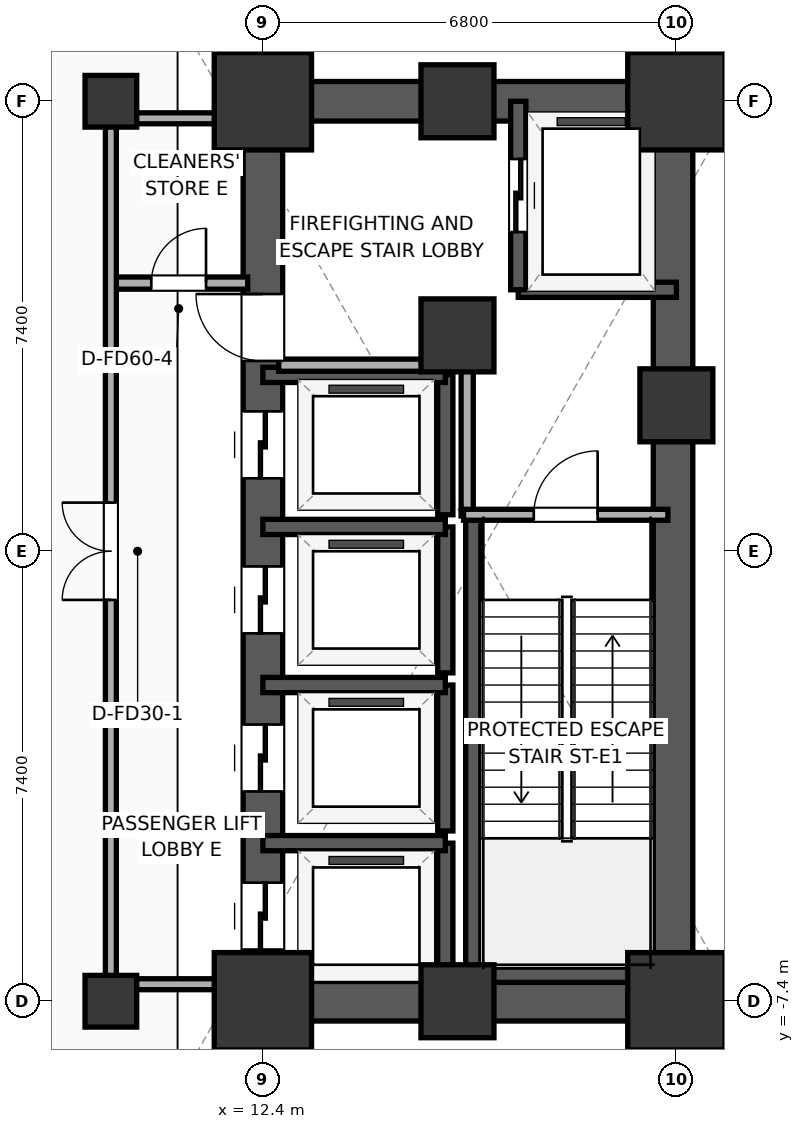
"""IFC4 building model, lengths in metres.
Left out: names, types, materials, properties, quantities, classifications, styles, units other than length and angle.
Written with IfcOpenShell. Run it as: python <this file> out.ifc"""

import sys

from ifc_helpers import new_model, si_unit, direction, frame, frame_2d, origin, origin_2d, place, context, subcontext, project, spatial, rectangle, extrude, element, fill, save


model = new_model("IFC4")
c1 = context("Model", 3, precision=1e-05, world=origin(), true_north=direction((0.0, 1.0)))
c2 = subcontext(c1, "Body", "Model", "MODEL_VIEW")
j1 = project(units=[si_unit("LENGTHUNIT", "METRE"), si_unit("PLANEANGLEUNIT", "RADIAN")], contexts=[c1])
p1 = place(None, origin())
s1 = spatial("IfcSite", under=j1, at=p1, CompositionType="ELEMENT")
p2 = place(p1, origin())
s2 = spatial("IfcBuilding", under=s1, at=p2, CompositionType="ELEMENT")
p3 = place(p2, frame((0.0, 0.0, -10.4)))
s3 = spatial("IfcBuildingStorey", under=s2, at=p3, CompositionType="ELEMENT", Elevation=-10.4)
p4 = place(p3, frame((12.4, -7.4, 0.0), z_axis=(0.0, 0.0, 1.0), x_axis=(1.0, 0.0, 0.0)))
e1 = element("IfcColumn", 1, at=p4, inside=s3, PredefinedType="COLUMN", context=c2, shape_type="SweptSolid", body=[
    extrude(rectangle(XDim=1.6, YDim=1.6, at=origin_2d()), origin(), (0.0, 0.0, 1.0), 5.2),
])
p5 = place(p3, frame((15.6, 3.55, 0.0), z_axis=(0.0, 0.0, 1.0), x_axis=(1.0, 0.0, 0.0)))
e2 = element("IfcColumn", 2, at=p5, inside=s3, PredefinedType="COLUMN", context=c2, shape_type="SweptSolid", body=[
    extrude(rectangle(XDim=1.2, YDim=1.2, at=origin_2d()), origin(), (0.0, 0.0, 1.0), 5.2),
])
p6 = place(p3, frame((12.4, 7.4, 0.0), z_axis=(0.0, 0.0, 1.0), x_axis=(1.0, 0.0, 0.0)))
e3 = element("IfcColumn", 3, at=p6, inside=s3, PredefinedType="COLUMN", context=c2, shape_type="SweptSolid", body=[
    extrude(rectangle(XDim=1.6, YDim=1.6, at=origin_2d()), origin(), (0.0, 0.0, 1.0), 5.2),
])
for number, where, z_axis, x_axis in (
    (4, (15.6, -7.4, 0.0), (0.0, 0.0, 1.0), (1.0, 0.0, 0.0)),
    (5, (15.6, 7.4, 0.0), (0.0, 0.0, 1.0), (1.0, 0.0, 0.0)),
):
    element("IfcColumn", number, at=place(p3, frame(where, z_axis=z_axis, x_axis=x_axis)), inside=s3, PredefinedType="COLUMN", context=c2, shape_type="SweptSolid", body=[
        extrude(rectangle(XDim=1.2, YDim=1.2, at=origin_2d()), origin(), (0.0, 0.0, 1.0), 5.2),
    ])
p7 = place(p3, frame((19.2, -7.4, 0.0), z_axis=(0.0, 0.0, 1.0), x_axis=(1.0, 0.0, 0.0)))
e6 = element("IfcColumn", 6, at=p7, inside=s3, PredefinedType="COLUMN", context=c2, shape_type="SweptSolid", body=[
    extrude(rectangle(XDim=1.6, YDim=1.6, at=origin_2d()), origin(), (0.0, 0.0, 1.0), 5.2),
])
p8 = place(p3, frame((19.2, 2.4, 0.0), z_axis=(0.0, 0.0, 1.0), x_axis=(1.0, 0.0, 0.0)))
e7 = element("IfcColumn", 7, at=p8, inside=s3, PredefinedType="COLUMN", context=c2, shape_type="SweptSolid", body=[
    extrude(rectangle(XDim=1.2, YDim=1.2, at=origin_2d()), origin(), (0.0, 0.0, 1.0), 5.2),
])
p9 = place(p3, frame((19.2, 7.4, 0.0), z_axis=(0.0, 0.0, 1.0), x_axis=(1.0, 0.0, 0.0)))
e8 = element("IfcColumn", 8, at=p9, inside=s3, PredefinedType="COLUMN", context=c2, shape_type="SweptSolid", body=[
    extrude(rectangle(XDim=1.6, YDim=1.6, at=origin_2d()), origin(), (0.0, 0.0, 1.0), 5.2),
])
for number, where, z_axis, x_axis in (
    (9, (12.075, -7.4, 0.0), (0.0, 0.0, 1.0), (1.0, 0.0, 0.0)),
    (10, (12.075, 7.4, 0.0), (0.0, 0.0, 1.0), (1.0, 0.0, 0.0)),
):
    element("IfcWall", number, at=place(p3, frame(where, z_axis=z_axis, x_axis=x_axis)), inside=s3, PredefinedType="SHEAR", context=c2, shape_type="SweptSolid", body=[
        extrude(rectangle(XDim=7.45, YDim=0.65, at=frame_2d((3.725, 0.0))), origin(), (0.0, 0.0, 1.0), 4.88),
    ])
p10 = place(p3, frame((12.4, -7.4, 0.0), z_axis=(0.0, 0.0, 1.0), x_axis=(0.0, 1.0, 0.0)))
e11 = element("IfcWall", 11, at=p10, inside=s3, PredefinedType="SHEAR", context=c2, shape_type="SweptSolid", body=[
    extrude(rectangle(XDim=14.8, YDim=0.65, at=frame_2d((7.4, 0.0))), origin(), (0.0, 0.0, 1.0), 4.88),
])
p11 = place(p10, frame((0.85, 0.0, 0.0)))
e12 = element("IfcOpeningElement", 12, at=p11, cuts=e11, PredefinedType="OPENING", context=c2, shape_type="SweptSolid", body=[
    extrude(rectangle(XDim=1.1, YDim=2.05, at=frame_2d((0.55, 1.025))), frame((0.0, 0.335, 0.0), z_axis=(0.0, -1.0, 0.0), x_axis=(1.0, 0.0, 0.0)), (0.0, 0.0, 1.0), 0.67),
])
p12 = place(p10, frame((3.45, 0.0, 0.0)))
e13 = element("IfcOpeningElement", 13, at=p12, cuts=e11, PredefinedType="OPENING", context=c2, shape_type="SweptSolid", body=[
    extrude(rectangle(XDim=1.1, YDim=2.05, at=frame_2d((0.55, 1.025))), frame((0.0, 0.335, 0.0), z_axis=(0.0, -1.0, 0.0), x_axis=(1.0, 0.0, 0.0)), (0.0, 0.0, 1.0), 0.67),
])
p13 = place(p10, frame((6.05, 0.0, 0.0)))
e14 = element("IfcOpeningElement", 14, at=p13, cuts=e11, PredefinedType="OPENING", context=c2, shape_type="SweptSolid", body=[
    extrude(rectangle(XDim=1.1, YDim=2.05, at=frame_2d((0.55, 1.025))), frame((0.0, 0.335, 0.0), z_axis=(0.0, -1.0, 0.0), x_axis=(1.0, 0.0, 0.0)), (0.0, 0.0, 1.0), 0.67),
])
p14 = place(p10, frame((8.6, 0.0, 0.0)))
e15 = element("IfcOpeningElement", 15, at=p14, cuts=e11, PredefinedType="OPENING", context=c2, shape_type="SweptSolid", body=[
    extrude(rectangle(XDim=1.1, YDim=2.05, at=frame_2d((0.55, 1.025))), frame((0.0, 0.335, 0.0), z_axis=(0.0, -1.0, 0.0), x_axis=(1.0, 0.0, 0.0)), (0.0, 0.0, 1.0), 0.67),
])
p15 = place(p10, frame((10.53, 0.0, 0.0)))
e16 = element("IfcOpeningElement", 16, at=p15, cuts=e11, PredefinedType="OPENING", context=c2, shape_type="SweptSolid", body=[
    extrude(rectangle(XDim=1.1, YDim=2.05, at=frame_2d((0.55, 1.025))), frame((0.0, 0.335, 0.0), z_axis=(0.0, -1.0, 0.0), x_axis=(1.0, 0.0, 0.0)), (0.0, 0.0, 1.0), 0.67),
])
p16 = place(p3, frame((19.145, -7.4, 0.0), z_axis=(0.0, 0.0, 1.0), x_axis=(0.0, 1.0, 0.0)))
e17 = element("IfcWall", 17, at=p16, inside=s3, PredefinedType="SHEAR", context=c2, shape_type="SweptSolid", body=[
    extrude(rectangle(XDim=14.8, YDim=0.65, at=frame_2d((7.4, 0.0))), origin(), (0.0, 0.0, 1.0), 4.88),
])
p17 = place(p3, frame((15.86, -7.085, 0.0), z_axis=(0.0, 0.0, 1.0), x_axis=(0.0, 1.0, 0.0)))
e18 = element("IfcWall", 18, at=p17, inside=s3, PredefinedType="SOLIDWALL", context=c2, shape_type="SweptSolid", body=[
    extrude(rectangle(XDim=7.685, YDim=0.25, at=frame_2d((3.843, 0.0))), origin(), (0.0, 0.0, 1.0), 4.88),
])
p18 = place(p3, frame((15.74, -6.965, 0.0), z_axis=(0.0, 0.0, 1.0), x_axis=(1.0, 0.0, 0.0)))
e19 = element("IfcWall", 19, at=p18, inside=s3, PredefinedType="SOLIDWALL", context=c2, shape_type="SweptSolid", body=[
    extrude(rectangle(XDim=3.46, YDim=0.25, at=frame_2d((1.73, 0.0))), origin(), (0.0, 0.0, 1.0), 4.88),
])
for number, where, z_axis, x_axis in (
    (20, (9.9, -7.4, 0.0), (0.0, 0.0, 1.0), (1.0, 0.0, 0.0)),
    (21, (9.9, 7.4, 0.0), (0.0, 0.0, 1.0), (1.0, 0.0, 0.0)),
):
    element("IfcColumn", number, at=place(p3, frame(where, z_axis=z_axis, x_axis=x_axis)), inside=s3, PredefinedType="COLUMN", context=c2, shape_type="SweptSolid", body=[
        extrude(rectangle(XDim=0.85, YDim=0.85, at=origin_2d()), origin(), (0.0, 0.0, 1.0), 5.2),
    ])
p19 = place(p3, frame((16.6, 4.3, 0.0), z_axis=(0.0, 0.0, 1.0), x_axis=(1.0, 0.0, 0.0)))
e22 = element("IfcWall", 22, at=p19, inside=s3, PredefinedType="SOLIDWALL", context=c2, shape_type="SweptSolid", body=[
    extrude(rectangle(XDim=2.6, YDim=0.25, at=frame_2d((1.3, 0.0))), origin(), (0.0, 0.0, 1.0), 4.88),
])
p20 = place(p3, frame((16.6, 7.4, 0.0), z_axis=(0.0, 0.0, 1.0), x_axis=(0.0, -1.0, 0.0)))
e23 = element("IfcWall", 23, at=p20, inside=s3, PredefinedType="SOLIDWALL", context=c2, shape_type="SweptSolid", body=[
    extrude(rectangle(XDim=3.1, YDim=0.25, at=frame_2d((1.55, 0.0))), origin(), (0.0, 0.0, 1.0), 4.88),
])
p21 = place(p20, frame((0.95, 0.0, 0.0)))
e24 = element("IfcOpeningElement", 24, at=p21, cuts=e23, PredefinedType="OPENING", context=c2, shape_type="SweptSolid", body=[
    extrude(rectangle(XDim=1.2, YDim=2.05, at=frame_2d((0.6, 1.025))), frame((0.0, 0.135, 0.0), z_axis=(0.0, -1.0, 0.0), x_axis=(1.0, 0.0, 0.0)), (0.0, 0.0, 1.0), 0.27),
])
p22 = place(p3, frame((15.4, -7.4, 0.0), z_axis=(0.0, 0.0, 1.0), x_axis=(0.0, 1.0, 0.0)))
e25 = element("IfcWall", 25, at=p22, inside=s3, PredefinedType="SOLIDWALL", context=c2, shape_type="SweptSolid", body=[
    extrude(rectangle(XDim=2.6, YDim=0.25, at=frame_2d((1.3, 0.0))), origin(), (0.0, 0.0, 1.0), 4.88),
])
p23 = place(p3, frame((15.4, -4.8, 0.0), z_axis=(0.0, 0.0, 1.0), x_axis=(-1.0, 0.0, 0.0)))
e26 = element("IfcWall", 26, at=p23, inside=s3, PredefinedType="SOLIDWALL", context=c2, shape_type="SweptSolid", body=[
    extrude(rectangle(XDim=3.0, YDim=0.25, at=frame_2d((1.5, 0.0))), origin(), (0.0, 0.0, 1.0), 4.88),
])
p24 = place(p3, frame((15.4, -4.6, 0.0), z_axis=(0.0, 0.0, 1.0), x_axis=(0.0, 1.0, 0.0)))
e27 = element("IfcWall", 27, at=p24, inside=s3, PredefinedType="SOLIDWALL", context=c2, shape_type="SweptSolid", body=[
    extrude(rectangle(XDim=2.4, YDim=0.25, at=frame_2d((1.2, 0.0))), origin(), (0.0, 0.0, 1.0), 4.88),
])
p25 = place(p3, frame((15.4, -2.2, 0.0), z_axis=(0.0, 0.0, 1.0), x_axis=(-1.0, 0.0, 0.0)))
e28 = element("IfcWall", 28, at=p25, inside=s3, PredefinedType="SOLIDWALL", context=c2, shape_type="SweptSolid", body=[
    extrude(rectangle(XDim=3.0, YDim=0.25, at=frame_2d((1.5, 0.0))), origin(), (0.0, 0.0, 1.0), 4.88),
])
p26 = place(p3, frame((15.4, -2.0, 0.0), z_axis=(0.0, 0.0, 1.0), x_axis=(0.0, 1.0, 0.0)))
e29 = element("IfcWall", 29, at=p26, inside=s3, PredefinedType="SOLIDWALL", context=c2, shape_type="SweptSolid", body=[
    extrude(rectangle(XDim=2.4, YDim=0.25, at=frame_2d((1.2, 0.0))), origin(), (0.0, 0.0, 1.0), 4.88),
])
p27 = place(p3, frame((15.4, 0.4, 0.0), z_axis=(0.0, 0.0, 1.0), x_axis=(-1.0, 0.0, 0.0)))
e30 = element("IfcWall", 30, at=p27, inside=s3, PredefinedType="SOLIDWALL", context=c2, shape_type="SweptSolid", body=[
    extrude(rectangle(XDim=3.0, YDim=0.25, at=frame_2d((1.5, 0.0))), origin(), (0.0, 0.0, 1.0), 4.88),
])
p28 = place(p3, frame((15.4, 0.6, 0.0), z_axis=(0.0, 0.0, 1.0), x_axis=(0.0, 1.0, 0.0)))
e31 = element("IfcWall", 31, at=p28, inside=s3, PredefinedType="SOLIDWALL", context=c2, shape_type="SweptSolid", body=[
    extrude(rectangle(XDim=2.3, YDim=0.25, at=frame_2d((1.15, 0.0))), origin(), (0.0, 0.0, 1.0), 4.88),
])
p29 = place(p3, frame((15.4, 2.9, 0.0), z_axis=(0.0, 0.0, 1.0), x_axis=(-1.0, 0.0, 0.0)))
e32 = element("IfcWall", 32, at=p29, inside=s3, PredefinedType="SOLIDWALL", context=c2, shape_type="SweptSolid", body=[
    extrude(rectangle(XDim=3.0, YDim=0.25, at=frame_2d((1.5, 0.0))), origin(), (0.0, 0.0, 1.0), 4.88),
])
p30 = place(p3, frame((15.76, 0.58, 0.0), z_axis=(0.0, 0.0, 1.0), x_axis=(0.0, 1.0, 0.0)))
e33 = element("IfcWall", 33, at=p30, inside=s3, PredefinedType="PARTITIONING", context=c2, shape_type="SweptSolid", body=[
    extrude(rectangle(XDim=2.52, YDim=0.2, at=frame_2d((1.26, 0.0))), origin(), (0.0, 0.0, 1.0), 4.88),
])
p31 = place(p3, frame((12.66, 3.06, 0.0), z_axis=(0.0, 0.0, 1.0), x_axis=(1.0, 0.0, 0.0)))
e34 = element("IfcWall", 34, at=p31, inside=s3, PredefinedType="PARTITIONING", context=c2, shape_type="SweptSolid", body=[
    extrude(rectangle(XDim=3.16, YDim=0.2, at=frame_2d((1.58, 0.0))), origin(), (0.0, 0.0, 1.0), 4.88),
])
p32 = place(p3, frame((15.7, 0.6, 0.0), z_axis=(0.0, 0.0, 1.0), x_axis=(1.0, 0.0, 0.0)))
e35 = element("IfcWall", 35, at=p32, inside=s3, PredefinedType="PARTITIONING", context=c2, shape_type="SweptSolid", body=[
    extrude(rectangle(XDim=3.36, YDim=0.18, at=frame_2d((1.68, 0.0))), origin(), (0.0, 0.0, 1.0), 4.88),
])
p33 = place(p32, frame((1.155, 0.0, 0.0)))
e36 = element("IfcOpeningElement", 36, at=p33, cuts=e35, PredefinedType="OPENING", context=c2, shape_type="SweptSolid", body=[
    extrude(rectangle(XDim=1.05, YDim=2.05, at=frame_2d((0.525, 1.025))), frame((0.0, 0.1, 0.0), z_axis=(0.0, -1.0, 0.0), x_axis=(1.0, 0.0, 0.0)), (0.0, 0.0, 1.0), 0.2),
])
p34 = place(p3, frame((9.88, 4.41, 0.0), z_axis=(0.0, 0.0, 1.0), x_axis=(1.0, 0.0, 0.0)))
e37 = element("IfcWall", 37, at=p34, inside=s3, PredefinedType="PARTITIONING", context=c2, shape_type="SweptSolid", body=[
    extrude(rectangle(XDim=2.27, YDim=0.2, at=frame_2d((1.135, 0.0))), origin(), (0.0, 0.0, 1.0), 4.88),
])
p35 = place(p34, frame((0.685, 0.0, 0.0)))
e38 = element("IfcOpeningElement", 38, at=p35, cuts=e37, PredefinedType="OPENING", context=c2, shape_type="SweptSolid", body=[
    extrude(rectangle(XDim=0.9, YDim=2.05, at=frame_2d((0.45, 1.025))), frame((0.0, 0.11, 0.0), z_axis=(0.0, -1.0, 0.0), x_axis=(1.0, 0.0, 0.0)), (0.0, 0.0, 1.0), 0.22),
])
for number, where, z_axis, x_axis in (
    (39, (9.88, 7.12, 0.0), (0.0, 0.0, 1.0), (1.0, 0.0, 0.0)),
    (40, (9.88, -7.12, 0.0), (0.0, 0.0, 1.0), (1.0, 0.0, 0.0)),
):
    element("IfcWall", number, at=place(p3, frame(where, z_axis=z_axis, x_axis=x_axis)), inside=s3, PredefinedType="PARTITIONING", context=c2, shape_type="SweptSolid", body=[
        extrude(rectangle(XDim=2.27, YDim=0.18, at=frame_2d((1.135, 0.0))), origin(), (0.0, 0.0, 1.0), 4.07),
    ])
p36 = place(p3, frame((9.9, -7.12, 0.0), z_axis=(0.0, 0.0, 1.0), x_axis=(0.0, 1.0, 0.0)))
e41 = element("IfcWall", 41, at=p36, inside=s3, PredefinedType="PARTITIONING", context=c2, shape_type="SweptSolid", body=[
    extrude(rectangle(XDim=14.24, YDim=0.18, at=frame_2d((7.12, 0.0))), origin(), (0.0, 0.0, 1.0), 4.07),
])
p37 = place(p36, frame((6.32, 0.0, 0.0)))
e42 = element("IfcOpeningElement", 42, at=p37, cuts=e41, PredefinedType="OPENING", context=c2, shape_type="SweptSolid", body=[
    extrude(rectangle(XDim=1.6, YDim=2.05, at=frame_2d((0.8, 1.025))), frame((0.0, 0.1, 0.0), z_axis=(0.0, -1.0, 0.0), x_axis=(1.0, 0.0, 0.0)), (0.0, 0.0, 1.0), 0.2),
])
p38 = place(p21, origin())
e43 = element("IfcDoor", 43, at=p38, inside=s3, OperationType="SLIDING_TO_LEFT", PredefinedType="DOOR", context=c2, shape_type="SweptSolid", body=[
    extrude(rectangle(XDim=1.2, YDim=2.05, at=frame_2d((0.6, 1.025))), frame((0.0, 0.025, 0.0), z_axis=(0.0, -1.0, 0.0), x_axis=(1.0, 0.0, 0.0)), (0.0, 0.0, 1.0), 0.05),
])
fill(e24, e43)
p39 = place(p11, origin())
e44 = element("IfcDoor", 44, at=p39, inside=s3, OperationType="SLIDING_TO_LEFT", PredefinedType="DOOR", context=c2, shape_type="SweptSolid", body=[
    extrude(rectangle(XDim=1.1, YDim=2.05, at=frame_2d((0.55, 1.025))), frame((0.0, 0.025, 0.0), z_axis=(0.0, -1.0, 0.0), x_axis=(1.0, 0.0, 0.0)), (0.0, 0.0, 1.0), 0.05),
])
fill(e12, e44)
p40 = place(p12, origin())
e45 = element("IfcDoor", 45, at=p40, inside=s3, OperationType="SLIDING_TO_LEFT", PredefinedType="DOOR", context=c2, shape_type="SweptSolid", body=[
    extrude(rectangle(XDim=1.1, YDim=2.05, at=frame_2d((0.55, 1.025))), frame((0.0, 0.025, 0.0), z_axis=(0.0, -1.0, 0.0), x_axis=(1.0, 0.0, 0.0)), (0.0, 0.0, 1.0), 0.05),
])
fill(e13, e45)
p41 = place(p13, origin())
e46 = element("IfcDoor", 46, at=p41, inside=s3, OperationType="SLIDING_TO_LEFT", PredefinedType="DOOR", context=c2, shape_type="SweptSolid", body=[
    extrude(rectangle(XDim=1.1, YDim=2.05, at=frame_2d((0.55, 1.025))), frame((0.0, 0.025, 0.0), z_axis=(0.0, -1.0, 0.0), x_axis=(1.0, 0.0, 0.0)), (0.0, 0.0, 1.0), 0.05),
])
fill(e14, e46)
p42 = place(p14, origin())
e47 = element("IfcDoor", 47, at=p42, inside=s3, OperationType="SLIDING_TO_LEFT", PredefinedType="DOOR", context=c2, shape_type="SweptSolid", body=[
    extrude(rectangle(XDim=1.1, YDim=2.05, at=frame_2d((0.55, 1.025))), frame((0.0, 0.025, 0.0), z_axis=(0.0, -1.0, 0.0), x_axis=(1.0, 0.0, 0.0)), (0.0, 0.0, 1.0), 0.05),
])
fill(e15, e47)
p43 = place(p33, origin())
e48 = element("IfcDoor", 48, at=p43, inside=s3, OperationType="SINGLE_SWING_RIGHT", PredefinedType="DOOR", context=c2, shape_type="SweptSolid", body=[
    extrude(rectangle(XDim=1.05, YDim=2.05, at=frame_2d((0.525, 1.025))), frame((0.0, 0.025, 0.0), z_axis=(0.0, -1.0, 0.0), x_axis=(1.0, 0.0, 0.0)), (0.0, 0.0, 1.0), 0.05),
])
fill(e36, e48)
p44 = place(p35, origin())
e49 = element("IfcDoor", 49, at=p44, inside=s3, OperationType="SINGLE_SWING_RIGHT", PredefinedType="DOOR", context=c2, shape_type="SweptSolid", body=[
    extrude(rectangle(XDim=0.9, YDim=2.05, at=frame_2d((0.45, 1.025))), frame((0.0, 0.025, 0.0), z_axis=(0.0, -1.0, 0.0), x_axis=(1.0, 0.0, 0.0)), (0.0, 0.0, 1.0), 0.05),
])
fill(e38, e49)
p45 = place(p37, origin())
e50 = element("IfcDoor", 50, at=p45, inside=s3, OperationType="DOUBLE_DOOR_SINGLE_SWING", PredefinedType="DOOR", context=c2, shape_type="SweptSolid", body=[
    extrude(rectangle(XDim=1.6, YDim=2.05, at=frame_2d((0.8, 1.025))), frame((0.0, 0.025, 0.0), z_axis=(0.0, -1.0, 0.0), x_axis=(1.0, 0.0, 0.0)), (0.0, 0.0, 1.0), 0.05),
])
fill(e42, e50)
p46 = place(p15, origin())
e51 = element("IfcDoor", 51, at=p46, inside=s3, OperationType="SINGLE_SWING_RIGHT", PredefinedType="DOOR", context=c2, shape_type="SweptSolid", body=[
    extrude(rectangle(XDim=1.1, YDim=2.05, at=frame_2d((0.55, 1.025))), frame((0.0, 0.025, 0.0), z_axis=(0.0, -1.0, 0.0), x_axis=(1.0, 0.0, 0.0)), (0.0, 0.0, 1.0), 0.05),
])
fill(e16, e51)
save(model, sys.argv[1])
